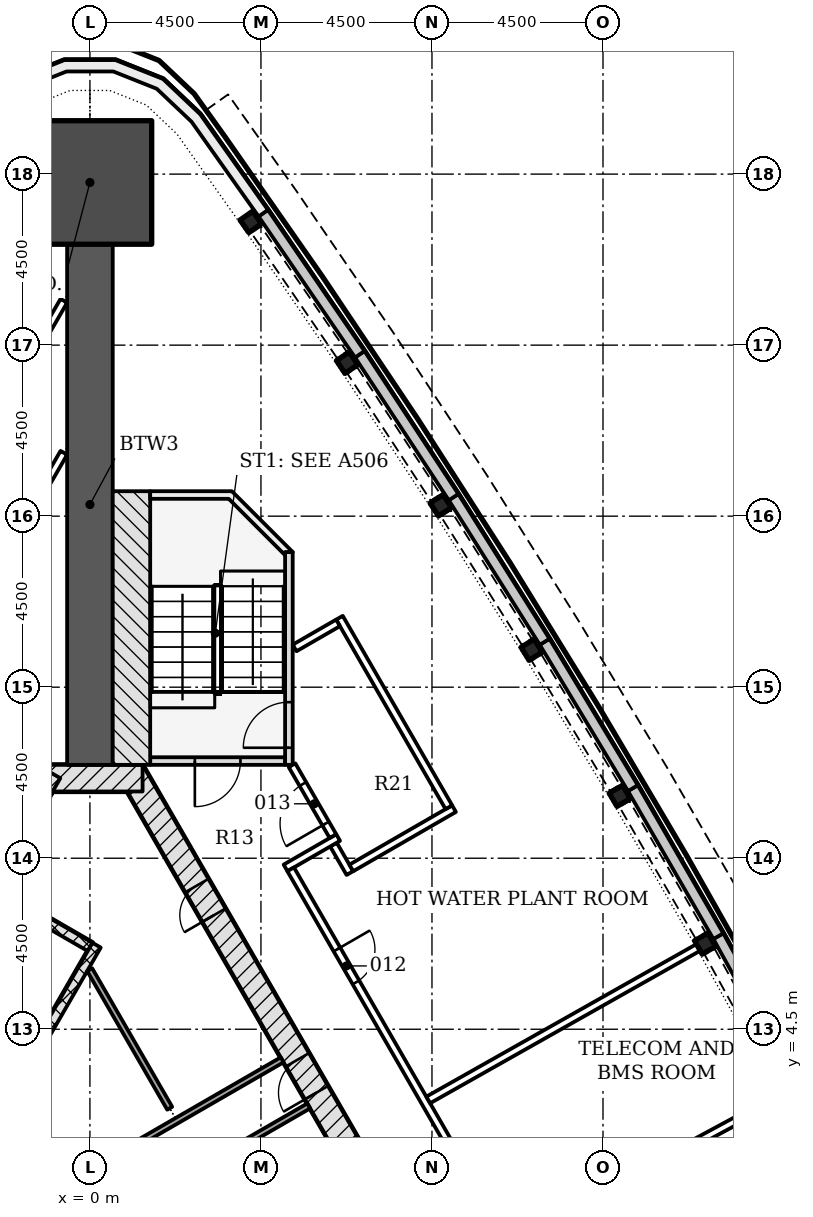
"""IFC4 building model, lengths in metres.
Left out: names, types, materials, properties, quantities, classifications, styles, units other than length and angle.
Written with IfcOpenShell. Run it as: python <this file> out.ifc"""

import sys

from ifc_helpers import new_model, si_unit, direction, frame, frame_2d, origin, origin_2d, place, context, subcontext, project, spatial, polyline, rectangle, i_section, outline, extrude, element, fill, save


model = new_model("IFC4")
c1 = context("Model", 3, precision=1e-05, world=origin(), true_north=direction((0.0, 1.0)))
c2 = subcontext(c1, "Body", "Model", "MODEL_VIEW")
j1 = project(units=[si_unit("LENGTHUNIT", "METRE"), si_unit("PLANEANGLEUNIT", "RADIAN")], contexts=[c1])
p1 = place(None, origin())
s1 = spatial("IfcSite", under=j1, at=p1, CompositionType="ELEMENT")
p2 = place(p1, origin())
s2 = spatial("IfcBuilding", under=s1, at=p2, CompositionType="ELEMENT")
p3 = place(p2, frame((0.0, 0.0, 52.8)))
s3 = spatial("IfcBuildingStorey", under=s2, at=p3, CompositionType="ELEMENT", Elevation=52.8)
p4 = place(p3, frame((10.311, -4.703, -0.3), z_axis=(0.0, 0.0, 1.0), x_axis=(-0.500001446645, 0.866024568562, 0.0)))
e1 = element("IfcWall", 1, at=p4, inside=s3, PredefinedType="SHEAR", context=c2, shape_type="SweptSolid", body=[
    extrude(rectangle(XDim=18.458, YDim=0.7, at=frame_2d((9.229, 0.0))), origin(), (0.0, 0.0, 1.0), 5.5),
])
p5 = place(p4, frame((8.7, 0.0, 0.3)))
e2 = element("IfcOpeningElement", 2, at=p5, cuts=e1, PredefinedType="OPENING", context=c2, shape_type="SweptSolid", body=[
    extrude(rectangle(XDim=1.0, YDim=2.1, at=frame_2d((0.5, 1.05))), frame((0.0, 0.36, 0.0), z_axis=(0.0, -1.0, 0.0), x_axis=(1.0, 0.0, 0.0)), (0.0, 0.0, 1.0), 0.72),
])
p6 = place(p4, frame((4.002, 0.0, 0.3)))
e3 = element("IfcOpeningElement", 3, at=p6, cuts=e1, PredefinedType="OPENING", context=c2, shape_type="SweptSolid", body=[
    extrude(rectangle(XDim=0.9, YDim=2.1, at=frame_2d((0.45, 1.05))), frame((0.0, 0.36, 0.0), z_axis=(0.0, -1.0, 0.0), x_axis=(1.0, 0.0, 0.0)), (0.0, 0.0, 1.0), 0.72),
])
p7 = place(p4, frame((14.093, 0.0, 0.3)))
e4 = element("IfcOpeningElement", 4, at=p7, cuts=e1, PredefinedType="OPENING", context=c2, shape_type="SweptSolid", body=[
    extrude(rectangle(XDim=0.9, YDim=2.1, at=frame_2d((0.45, 1.05))), frame((0.0, 0.36, 0.0), z_axis=(0.0, -1.0, 0.0), x_axis=(1.0, 0.0, 0.0)), (0.0, 0.0, 1.0), 0.72),
])
p8 = place(p3, frame((1.386, 11.106, -0.3), z_axis=(0.0, 0.0, 1.0), x_axis=(-1.0, 0.0, 0.0)))
e5 = element("IfcWall", 5, at=p8, inside=s3, PredefinedType="SHEAR", context=c2, shape_type="SweptSolid", body=[
    extrude(rectangle(XDim=2.771, YDim=0.7, at=frame_2d((1.386, 0.0))), origin(), (0.0, 0.0, 1.0), 5.5),
])
p9 = place(p3, frame((-1.083, 11.281, -0.3), z_axis=(0.0, 0.0, 1.0), x_axis=(-0.500001446645, -0.866024568562, 0.0)))
e6 = element("IfcWall", 6, at=p9, inside=s3, PredefinedType="SHEAR", context=c2, shape_type="SweptSolid", body=[
    extrude(rectangle(XDim=18.458, YDim=0.7, at=frame_2d((9.229, 0.0))), origin(), (0.0, 0.0, 1.0), 5.5),
])
p10 = place(p9, frame((8.979, 0.0, 0.3)))
e7 = element("IfcOpeningElement", 7, at=p10, cuts=e6, PredefinedType="OPENING", context=c2, shape_type="SweptSolid", body=[
    extrude(rectangle(XDim=1.2, YDim=2.1, at=frame_2d((0.6, 1.05))), frame((0.0, 0.36, 0.0), z_axis=(0.0, -1.0, 0.0), x_axis=(1.0, 0.0, 0.0)), (0.0, 0.0, 1.0), 0.72),
])
p11 = place(p9, frame((11.029, 0.0, 0.3)))
e8 = element("IfcOpeningElement", 8, at=p11, cuts=e6, PredefinedType="OPENING", context=c2, shape_type="SweptSolid", body=[
    extrude(rectangle(XDim=1.2, YDim=2.1, at=frame_2d((0.6, 1.05))), frame((0.0, 0.36, 0.0), z_axis=(0.0, -1.0, 0.0), x_axis=(1.0, 0.0, 0.0)), (0.0, 0.0, 1.0), 0.72),
])
p12 = place(p3, frame((0.0, 11.456, -0.3), z_axis=(0.0, 0.0, 1.0), x_axis=(0.0, 1.0, 0.0)))
e9 = element("IfcWall", 9, at=p12, inside=s3, PredefinedType="SHEAR", context=c2, shape_type="SweptSolid", body=[
    extrude(rectangle(XDim=13.699, YDim=1.2, at=frame_2d((6.849, 0.0))), origin(), (0.0, 0.0, 1.0), 5.5),
])
p13 = place(p3, frame((0.0, 26.78, -0.3), z_axis=(0.0, 0.0, 1.0), x_axis=(0.0, 1.0, 0.0)))
e10 = element("IfcColumn", 10, at=p13, inside=s3, PredefinedType="COLUMN", context=c2, shape_type="SweptSolid", body=[
    extrude(rectangle(XDim=3.25, YDim=3.25, at=origin_2d()), origin(), (0.0, 0.0, 1.0), 5.5),
])
for number, where, z_axis, x_axis in (
    (11, (16.186, 6.753, -0.3), (0.0, 0.0, 1.0), (-0.492, 0.871, 0.0)),
    (12, (13.941, 10.641, -0.3), (0.0, 0.0, 1.0), (-0.508, 0.861, 0.0)),
    (13, (11.623, 14.485, -0.3), (0.0, 0.0, 1.0), (-0.525, 0.851, 0.0)),
    (14, (9.231, 18.285, -0.3), (0.0, 0.0, 1.0), (-0.541, 0.841, 0.0)),
    (15, (6.768, 22.038, -0.3), (0.0, 0.0, 1.0), (-0.557, 0.831, 0.0)),
    (16, (4.233, 25.743, -0.3), (0.0, 0.0, 1.0), (-0.572, 0.82, 0.0)),
):
    element("IfcColumn", number, at=place(p3, frame(where, z_axis=z_axis, x_axis=x_axis)), inside=s3, PredefinedType="COLUMN", context=c2, shape_type="SweptSolid", body=[
        extrude(i_section(OverallWidth=0.404, OverallDepth=0.406, WebThickness=0.027, FlangeThickness=0.044, FilletRadius=0.015, at=origin_2d()), origin(), (0.0, 0.0, 1.0), 5.5),
    ])
p14 = place(p3, origin())
e17 = element("IfcWall", 17, at=p14, inside=s3, PredefinedType="NOTDEFINED", context=c2, shape_type="SweptSolid", body=[
    extrude(outline(polyline([(18.84, 3.084), (16.665, 7.023), (16.402, 6.878), (18.578, 2.939), (18.84, 3.084)])), origin(), (0.0, 0.0, 1.0), 1.2),
])
p15 = place(p3, origin())
e18 = element("IfcWall", 18, at=p15, inside=s3, PredefinedType="NOTDEFINED", context=c2, shape_type="SweptSolid", body=[
    extrude(outline(polyline([(16.665, 7.023), (14.415, 10.921), (14.155, 10.771), (16.405, 6.874), (16.665, 7.023)])), origin(), (0.0, 0.0, 1.0), 1.2),
])
p16 = place(p3, origin())
e19 = element("IfcWall", 19, at=p16, inside=s3, PredefinedType="NOTDEFINED", context=c2, shape_type="SweptSolid", body=[
    extrude(outline(polyline([(14.415, 10.921), (12.091, 14.774), (11.834, 14.619), (14.158, 10.766), (14.415, 10.921)])), origin(), (0.0, 0.0, 1.0), 1.2),
])
p17 = place(p3, origin())
e20 = element("IfcWall", 20, at=p17, inside=s3, PredefinedType="NOTDEFINED", context=c2, shape_type="SweptSolid", body=[
    extrude(outline(polyline([(12.091, 14.774), (9.694, 18.582), (9.44, 18.422), (11.837, 14.614), (12.091, 14.774)])), origin(), (0.0, 0.0, 1.0), 1.2),
])
p18 = place(p3, origin())
e21 = element("IfcWall", 21, at=p18, inside=s3, PredefinedType="NOTDEFINED", context=c2, shape_type="SweptSolid", body=[
    extrude(outline(polyline([(9.694, 18.582), (7.225, 22.344), (6.974, 22.179), (9.443, 18.418), (9.694, 18.582)])), origin(), (0.0, 0.0, 1.0), 1.2),
])
p19 = place(p3, origin())
e22 = element("IfcWall", 22, at=p19, inside=s3, PredefinedType="NOTDEFINED", context=c2, shape_type="SweptSolid", body=[
    extrude(outline(polyline([(7.225, 22.344), (4.684, 26.058), (4.436, 25.889), (6.977, 22.175), (7.225, 22.344)])), origin(), (0.0, 0.0, 1.0), 1.2),
])
p20 = place(p3, origin())
e23 = element("IfcWall", 23, at=p20, inside=s3, PredefinedType="NOTDEFINED", context=c2, shape_type="SweptSolid", body=[
    extrude(outline(polyline([(4.684, 26.058), (2.901, 28.576), (1.924, 29.502), (0.673, 30.001), (-0.673, 30.001), (-1.924, 29.502), (-2.901, 28.576), (-4.684, 26.058), (-4.439, 25.885), (-2.673, 28.379), (-1.759, 29.245), (-0.615, 29.701), (0.615, 29.701), (1.759, 29.245), (2.673, 28.379), (4.439, 25.885), (4.684, 26.058)])), origin(), (0.0, 0.0, 1.0), 5.2),
])
p21 = place(p3, frame((-2.506, 8.115, -0.3), z_axis=(0.0, 0.0, 1.0), x_axis=(0.865996321171, -0.50005036918, 0.0)))
e24 = element("IfcWall", 24, at=p21, inside=s3, PredefinedType="PARTITIONING", context=c2, shape_type="SweptSolid", body=[
    extrude(rectangle(XDim=2.9, YDim=0.25, at=frame_2d((1.45, 0.0))), origin(), (0.0, 0.0, 1.0), 5.5),
])
p22 = place(p3, frame((0.176, 6.711, 0.0), z_axis=(0.0, 0.0, 1.0), x_axis=(-0.500004227369, -0.866022963098, 0.0)))
e25 = element("IfcWall", 25, at=p22, inside=s3, PredefinedType="PARTITIONING", context=c2, shape_type="SweptSolid", body=[
    extrude(rectangle(XDim=11.8, YDim=0.25, at=frame_2d((5.9, 0.0))), origin(), (0.0, 0.0, 1.0), 5.2),
])
p23 = place(p3, frame((-4.548, -1.851, 0.0), z_axis=(0.0, 0.0, 1.0), x_axis=(0.866023939251, 0.500002536638, 0.0)))
e26 = element("IfcWall", 26, at=p23, inside=s3, PredefinedType="PARTITIONING", context=c2, shape_type="SweptSolid", body=[
    extrude(rectangle(XDim=11.092, YDim=0.15, at=frame_2d((5.546, 0.0))), origin(), (0.0, 0.0, 1.0), 5.2),
])
p24 = place(p23, frame((3.497, 0.0, 0.0)))
e27 = element("IfcOpeningElement", 27, at=p24, cuts=e26, PredefinedType="OPENING", context=c2, shape_type="SweptSolid", body=[
    extrude(rectangle(XDim=0.9, YDim=2.1, at=frame_2d((0.45, 1.05))), frame((0.0, 0.085, 0.0), z_axis=(0.0, -1.0, 0.0), x_axis=(1.0, 0.0, 0.0)), (0.0, 0.0, 1.0), 0.17),
])
p25 = place(p3, frame((2.099, 2.42, 0.0), z_axis=(0.0, 0.0, 1.0), x_axis=(-0.499998449073, 0.866026299211, 0.0)))
e28 = element("IfcWall", 28, at=p25, inside=s3, PredefinedType="PARTITIONING", context=c2, shape_type="SweptSolid", body=[
    extrude(rectangle(XDim=4.211, YDim=0.15, at=frame_2d((2.106, 0.0))), origin(), (0.0, 0.0, 1.0), 5.2),
])
p26 = place(p3, frame((-4.454, -3.413, 0.0), z_axis=(0.0, 0.0, 1.0), x_axis=(0.86603043987, 0.499991277142, 0.0)))
e29 = element("IfcWall", 29, at=p26, inside=s3, PredefinedType="PARTITIONING", context=c2, shape_type="SweptSolid", body=[
    extrude(rectangle(XDim=11.792, YDim=0.15, at=frame_2d((5.896, 0.0))), origin(), (0.0, 0.0, 1.0), 5.2),
])
p27 = place(p26, frame((3.847, 0.0, 0.0)))
e30 = element("IfcOpeningElement", 30, at=p27, cuts=e29, PredefinedType="OPENING", context=c2, shape_type="SweptSolid", body=[
    extrude(rectangle(XDim=0.9, YDim=2.1, at=frame_2d((0.45, 1.05))), frame((0.0, 0.085, 0.0), z_axis=(0.0, -1.0, 0.0), x_axis=(1.0, 0.0, 0.0)), (0.0, 0.0, 1.0), 0.17),
])
p28 = place(p3, frame((5.135, 11.556, -0.3), z_axis=(0.0, 0.0, 1.0), x_axis=(-1.0, 0.0, 0.0)))
e31 = element("IfcWall", 31, at=p28, inside=s3, PredefinedType="SHEAR", context=c2, shape_type="SweptSolid", body=[
    extrude(rectangle(XDim=3.55, YDim=0.2, at=frame_2d((1.775, 0.0))), origin(), (0.0, 0.0, 1.0), 5.5),
])
p29 = place(p28, frame((1.175, 0.0, 0.3)))
e32 = element("IfcOpeningElement", 32, at=p29, cuts=e31, PredefinedType="OPENING", context=c2, shape_type="SweptSolid", body=[
    extrude(rectangle(XDim=1.2, YDim=2.1, at=frame_2d((0.6, 1.05))), frame((0.0, 0.11, 0.0), z_axis=(0.0, -1.0, 0.0), x_axis=(1.0, 0.0, 0.0)), (0.0, 0.0, 1.0), 0.22),
])
p30 = place(p3, frame((5.236, 11.456, -0.3), z_axis=(0.0, 0.0, 1.0), x_axis=(0.0, 1.0, 0.0)))
e33 = element("IfcWall", 33, at=p30, inside=s3, PredefinedType="SHEAR", context=c2, shape_type="SweptSolid", body=[
    extrude(rectangle(XDim=5.6, YDim=0.2, at=frame_2d((2.8, 0.0))), origin(), (0.0, 0.0, 1.0), 5.5),
])
p31 = place(p30, frame((0.45, 0.0, 0.3)))
e34 = element("IfcOpeningElement", 34, at=p31, cuts=e33, PredefinedType="OPENING", context=c2, shape_type="SweptSolid", body=[
    extrude(rectangle(XDim=1.2, YDim=2.1, at=frame_2d((0.6, 1.05))), frame((0.0, 0.11, 0.0), z_axis=(0.0, -1.0, 0.0), x_axis=(1.0, 0.0, 0.0)), (0.0, 0.0, 1.0), 0.22),
])
p32 = place(p3, frame((1.093, 11.456, -0.3), z_axis=(0.0, 0.0, 1.0), x_axis=(0.0, 1.0, 0.0)))
e35 = element("IfcWall", 35, at=p32, inside=s3, PredefinedType="SHEAR", context=c2, shape_type="SweptSolid", body=[
    extrude(rectangle(XDim=7.2, YDim=0.986, at=frame_2d((3.6, 0.0))), origin(), (0.0, 0.0, 1.0), 5.5),
])
p33 = place(p3, frame((0.0, 0.0, -0.3)))
e36 = element("IfcWall", 36, at=p33, inside=s3, PredefinedType="SHEAR", context=c2, shape_type="SweptSolid", body=[
    extrude(outline(polyline([(5.336, 17.056), (3.736, 18.656), (1.586, 18.656), (1.586, 18.456), (3.653, 18.456), (5.135, 16.974), (5.135, 17.056), (5.135, 17.056), (5.135, 17.056), (5.135, 17.056), (5.135, 17.056), (5.135, 17.056), (5.135, 17.056), (5.135, 17.056), (5.135, 17.056), (5.135, 17.056), (5.135, 17.056), (5.135, 17.056), (5.135, 17.056), (5.135, 17.056), (5.135, 17.056), (5.135, 17.056), (5.135, 17.056), (5.336, 17.056)])), origin(), (0.0, 0.0, 1.0), 5.5),
])
p34 = place(p3, frame((-0.687, 19.667, 0.0), z_axis=(0.0, 0.0, 1.0), x_axis=(-0.500000491645, -0.866025119933, 0.0)))
e37 = element("IfcWall", 37, at=p34, inside=s3, PredefinedType="PARTITIONING", context=c2, shape_type="SweptSolid", body=[
    extrude(rectangle(XDim=23.943, YDim=0.2, at=frame_2d((11.971, 0.0))), origin(), (0.0, 0.0, 1.0), 4.578),
])
p35 = place(p34, frame((16.287, 0.0, 0.0)))
e38 = element("IfcOpeningElement", 38, at=p35, cuts=e37, PredefinedType="OPENING", context=c2, shape_type="SweptSolid", body=[
    extrude(rectangle(XDim=1.2, YDim=2.1, at=frame_2d((0.6, 1.05))), frame((0.0, 0.11, 0.0), z_axis=(0.0, -1.0, 0.0), x_axis=(1.0, 0.0, 0.0)), (0.0, 0.0, 1.0), 0.22),
])
p36 = place(p3, frame((-16.104, -3.037, 0.0), z_axis=(0.0, 0.0, 1.0), x_axis=(0.500000029135, 0.866025386963, 0.0)))
e39 = element("IfcWall", 39, at=p36, inside=s3, PredefinedType="PARTITIONING", context=c2, shape_type="SweptSolid", body=[
    extrude(rectangle(XDim=30.835, YDim=0.2, at=frame_2d((15.417, 0.0))), origin(), (0.0, 0.0, 1.0), 4.578),
])
p37 = place(p36, frame((23.641, 0.0, 0.0)))
e40 = element("IfcOpeningElement", 40, at=p37, cuts=e39, PredefinedType="OPENING", context=c2, shape_type="SweptSolid", body=[
    extrude(rectangle(XDim=1.0, YDim=2.1, at=frame_2d((0.5, 1.05))), frame((0.0, 0.11, 0.0), z_axis=(0.0, -1.0, 0.0), x_axis=(1.0, 0.0, 0.0)), (0.0, 0.0, 1.0), 0.22),
])
p38 = place(p36, frame((14.681, 0.0, 0.0)))
e41 = element("IfcOpeningElement", 41, at=p38, cuts=e39, PredefinedType="OPENING", context=c2, shape_type="SweptSolid", body=[
    extrude(rectangle(XDim=1.0, YDim=2.1, at=frame_2d((0.5, 1.05))), frame((0.0, 0.11, 0.0), z_axis=(0.0, -1.0, 0.0), x_axis=(1.0, 0.0, 0.0)), (0.0, 0.0, 1.0), 0.22),
])
p39 = place(p36, frame((10.698, 0.0, 0.0)))
e42 = element("IfcOpeningElement", 42, at=p39, cuts=e39, PredefinedType="OPENING", context=c2, shape_type="SweptSolid", body=[
    extrude(rectangle(XDim=1.0, YDim=2.1, at=frame_2d((0.5, 1.05))), frame((0.0, 0.11, 0.0), z_axis=(0.0, -1.0, 0.0), x_axis=(1.0, 0.0, 0.0)), (0.0, 0.0, 1.0), 0.22),
])
p40 = place(p36, frame((6.51, 0.0, 0.0)))
e43 = element("IfcOpeningElement", 43, at=p40, cuts=e39, PredefinedType="OPENING", context=c2, shape_type="SweptSolid", body=[
    extrude(rectangle(XDim=1.0, YDim=2.1, at=frame_2d((0.5, 1.05))), frame((0.0, 0.11, 0.0), z_axis=(0.0, -1.0, 0.0), x_axis=(1.0, 0.0, 0.0)), (0.0, 0.0, 1.0), 0.22),
])
p41 = place(p36, frame((1.885, 0.0, 0.0)))
e44 = element("IfcOpeningElement", 44, at=p41, cuts=e39, PredefinedType="OPENING", context=c2, shape_type="SweptSolid", body=[
    extrude(rectangle(XDim=1.0, YDim=2.1, at=frame_2d((0.5, 1.05))), frame((0.0, 0.11, 0.0), z_axis=(0.0, -1.0, 0.0), x_axis=(1.0, 0.0, 0.0)), (0.0, 0.0, 1.0), 0.22),
])
p42 = place(p3, frame((6.408, 9.358, 0.0), z_axis=(0.0, 0.0, 1.0), x_axis=(0.49996696679, -0.866044474677, 0.0)))
e45 = element("IfcWall", 45, at=p42, inside=s3, PredefinedType="PARTITIONING", context=c2, shape_type="SweptSolid", body=[
    extrude(rectangle(XDim=0.864, YDim=0.2, at=frame_2d((0.432, 0.0))), origin(), (0.0, 0.0, 1.0), 5.2),
])
p43 = place(p3, frame((5.147, 8.745, 0.0), z_axis=(0.0, 0.0, 1.0), x_axis=(0.865987117328, 0.500066308224, 0.0)))
e46 = element("IfcWall", 46, at=p43, inside=s3, PredefinedType="PARTITIONING", context=c2, shape_type="SweptSolid", body=[
    extrude(rectangle(XDim=1.598, YDim=0.2, at=frame_2d((0.799, 0.0))), origin(), (0.0, 0.0, 1.0), 5.2),
])
p44 = place(p3, frame((6.395, 9.581, 0.0), z_axis=(0.0, 0.0, 1.0), x_axis=(-0.500003735859, 0.866023246874, 0.0)))
e47 = element("IfcWall", 47, at=p44, inside=s3, PredefinedType="PARTITIONING", context=c2, shape_type="SweptSolid", body=[
    extrude(rectangle(XDim=2.154, YDim=0.2, at=frame_2d((1.077, 0.0))), origin(), (0.0, 0.0, 1.0), 4.578),
])
p45 = place(p44, frame((0.383, 0.0, 0.0)))
e48 = element("IfcOpeningElement", 48, at=p45, cuts=e47, PredefinedType="OPENING", context=c2, shape_type="SweptSolid", body=[
    extrude(rectangle(XDim=1.2, YDim=2.1, at=frame_2d((0.6, 1.05))), frame((0.0, 0.11, 0.0), z_axis=(0.0, -1.0, 0.0), x_axis=(1.0, 0.0, 0.0)), (0.0, 0.0, 1.0), 0.22),
])
p46 = place(p3, frame((5.282, 8.708, 0.0), z_axis=(0.0, 0.0, 1.0), x_axis=(0.500007704848, -0.866020955343, 0.0)))
e49 = element("IfcWall", 49, at=p46, inside=s3, PredefinedType="PARTITIONING", context=c2, shape_type="SweptSolid", body=[
    extrude(rectangle(XDim=18.991, YDim=0.2, at=frame_2d((9.496, 0.0))), origin(), (0.0, 0.0, 1.0), 4.578),
])
p47 = place(p46, frame((14.779, 0.0, 0.0)))
e50 = element("IfcOpeningElement", 50, at=p47, cuts=e49, PredefinedType="OPENING", context=c2, shape_type="SweptSolid", body=[
    extrude(rectangle(XDim=1.0, YDim=2.1, at=frame_2d((0.5, 1.05))), frame((0.0, 0.11, 0.0), z_axis=(0.0, -1.0, 0.0), x_axis=(1.0, 0.0, 0.0)), (0.0, 0.0, 1.0), 0.22),
])
p48 = place(p46, frame((8.83, 0.0, 0.0)))
e51 = element("IfcOpeningElement", 51, at=p48, cuts=e49, PredefinedType="OPENING", context=c2, shape_type="SweptSolid", body=[
    extrude(rectangle(XDim=1.0, YDim=2.1, at=frame_2d((0.5, 1.05))), frame((0.0, 0.11, 0.0), z_axis=(0.0, -1.0, 0.0), x_axis=(1.0, 0.0, 0.0)), (0.0, 0.0, 1.0), 0.22),
])
p49 = place(p46, frame((2.435, 0.0, 0.0)))
e52 = element("IfcOpeningElement", 52, at=p49, cuts=e49, PredefinedType="OPENING", context=c2, shape_type="SweptSolid", body=[
    extrude(rectangle(XDim=1.0, YDim=2.1, at=frame_2d((0.5, 1.05))), frame((0.0, 0.11, 0.0), z_axis=(0.0, -1.0, 0.0), x_axis=(1.0, 0.0, 0.0)), (0.0, 0.0, 1.0), 0.22),
])
p50 = place(p3, frame((11.069, -1.11, 0.0), z_axis=(0.0, 0.0, 1.0), x_axis=(0.879990497743, 0.474991288218, 0.0)))
e53 = element("IfcWall", 53, at=p50, inside=s3, PredefinedType="PARTITIONING", context=c2, shape_type="SweptSolid", body=[
    extrude(rectangle(XDim=8.131, YDim=0.2, at=frame_2d((4.065, 0.0))), origin(), (0.0, 0.0, 1.0), 4.578),
])
p51 = place(p3, frame((8.902, 2.64, 0.0), z_axis=(0.0, 0.0, 1.0), x_axis=(0.87077197932, 0.491687054976, 0.0)))
e54 = element("IfcWall", 54, at=p51, inside=s3, PredefinedType="PARTITIONING", context=c2, shape_type="SweptSolid", body=[
    extrude(rectangle(XDim=8.215, YDim=0.2, at=frame_2d((4.107, 0.0))), origin(), (0.0, 0.0, 1.0), 4.578),
])
p52 = place(p3, frame((6.878, 8.744, 0.0), z_axis=(0.0, 0.0, 1.0), x_axis=(0.866023983177, 0.500002460556, 0.0)))
e55 = element("IfcWall", 55, at=p52, inside=s3, PredefinedType="PARTITIONING", context=c2, shape_type="SweptSolid", body=[
    extrude(rectangle(XDim=3.12, YDim=0.2, at=frame_2d((1.56, 0.0))), origin(), (0.0, 0.0, 1.0), 5.2),
])
p53 = place(p3, frame((6.566, 15.327, 0.0), z_axis=(0.0, 0.0, 1.0), x_axis=(0.499997778408, -0.866026686418, 0.0)))
e56 = element("IfcWall", 56, at=p53, inside=s3, PredefinedType="PARTITIONING", context=c2, shape_type="SweptSolid", body=[
    extrude(rectangle(XDim=5.757, YDim=0.2, at=frame_2d((2.878, 0.0))), origin(), (0.0, 0.0, 1.0), 4.578),
])
p54 = place(p3, frame((6.529, 15.192, 0.0), z_axis=(0.0, 0.0, 1.0), x_axis=(-0.866117824122, -0.499839889103, 0.0)))
e57 = element("IfcWall", 57, at=p54, inside=s3, PredefinedType="PARTITIONING", context=c2, shape_type="SweptSolid", body=[
    extrude(rectangle(XDim=1.32, YDim=0.2, at=frame_2d((0.66, 0.0))), origin(), (0.0, 0.0, 1.0), 5.2),
])
p55 = place(p5, origin())
e58 = element("IfcDoor", 58, at=p55, inside=s3, OperationType="SINGLE_SWING_LEFT", PredefinedType="DOOR", context=c2, shape_type="SweptSolid", body=[
    extrude(rectangle(XDim=1.0, YDim=2.1, at=frame_2d((0.5, 1.05))), frame((0.0, 0.075, 0.0), z_axis=(0.0, -1.0, 0.0), x_axis=(1.0, 0.0, 0.0)), (0.0, 0.0, 1.0), 0.15),
])
fill(e2, e58)
p56 = place(p7, origin())
e59 = element("IfcDoor", 59, at=p56, inside=s3, OperationType="SINGLE_SWING_LEFT", PredefinedType="DOOR", context=c2, shape_type="SweptSolid", body=[
    extrude(rectangle(XDim=0.9, YDim=2.1, at=frame_2d((0.45, 1.05))), frame((0.0, 0.075, 0.0), z_axis=(0.0, -1.0, 0.0), x_axis=(1.0, 0.0, 0.0)), (0.0, 0.0, 1.0), 0.15),
])
fill(e4, e59)
p57 = place(p29, origin())
e60 = element("IfcDoor", 60, at=p57, inside=s3, OperationType="SINGLE_SWING_RIGHT", PredefinedType="DOOR", context=c2, shape_type="SweptSolid", body=[
    extrude(rectangle(XDim=1.2, YDim=2.1, at=frame_2d((0.6, 1.05))), frame((0.0, 0.025, 0.0), z_axis=(0.0, -1.0, 0.0), x_axis=(1.0, 0.0, 0.0)), (0.0, 0.0, 1.0), 0.05),
])
fill(e32, e60)
p58 = place(p31, origin())
e61 = element("IfcDoor", 61, at=p58, inside=s3, OperationType="SINGLE_SWING_LEFT", PredefinedType="DOOR", context=c2, shape_type="SweptSolid", body=[
    extrude(rectangle(XDim=1.2, YDim=2.1, at=frame_2d((0.6, 1.05))), frame((0.0, 0.025, 0.0), z_axis=(0.0, -1.0, 0.0), x_axis=(1.0, 0.0, 0.0)), (0.0, 0.0, 1.0), 0.05),
])
fill(e34, e61)
p59 = place(p49, origin())
e62 = element("IfcDoor", 62, at=p59, inside=s3, OperationType="SINGLE_SWING_LEFT", PredefinedType="DOOR", context=c2, shape_type="SweptSolid", body=[
    extrude(rectangle(XDim=1.0, YDim=2.1, at=frame_2d((0.5, 1.05))), frame((0.0, 0.025, 0.0), z_axis=(0.0, -1.0, 0.0), x_axis=(1.0, 0.0, 0.0)), (0.0, 0.0, 1.0), 0.05),
])
fill(e52, e62)
p60 = place(p45, origin())
e63 = element("IfcDoor", 63, at=p60, inside=s3, OperationType="SINGLE_SWING_LEFT", PredefinedType="DOOR", context=c2, shape_type="SweptSolid", body=[
    extrude(rectangle(XDim=1.2, YDim=2.1, at=frame_2d((0.6, 1.05))), frame((0.0, 0.025, 0.0), z_axis=(0.0, -1.0, 0.0), x_axis=(1.0, 0.0, 0.0)), (0.0, 0.0, 1.0), 0.05),
])
fill(e48, e63)
save(model, sys.argv[1])
